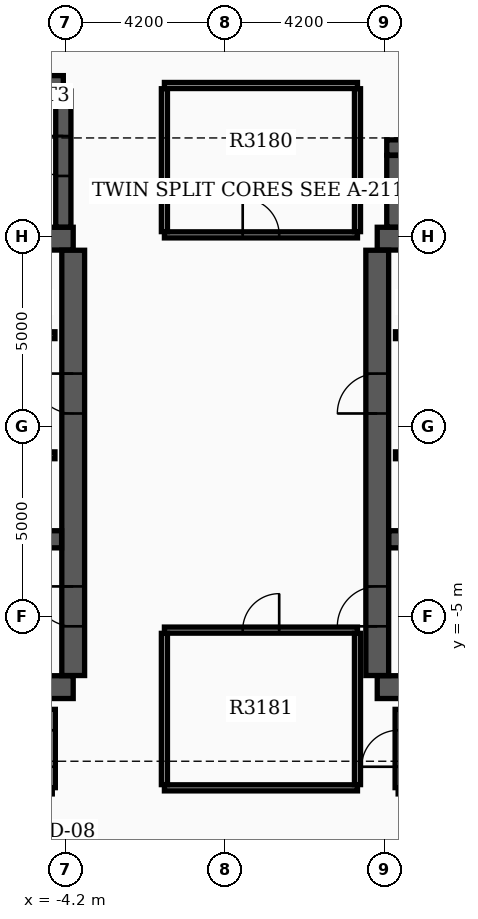
"""IFC4 building model, lengths in metres.
Left out: names, types, materials, properties, quantities, classifications, styles, units other than length and angle.
Written with IfcOpenShell. Run it as: python <this file> out.ifc"""

import sys

from ifc_helpers import new_model, si_unit, direction, frame, frame_2d, origin, place, context, subcontext, project, spatial, rectangle, extrude, element, fill, save


model = new_model("IFC4")
c1 = context("Model", 3, precision=1e-05, world=origin(), true_north=direction((0.0, 1.0)))
c2 = subcontext(c1, "Body", "Model", "MODEL_VIEW")
j1 = project(units=[si_unit("LENGTHUNIT", "METRE"), si_unit("PLANEANGLEUNIT", "RADIAN")], contexts=[c1])
p1 = place(None, origin())
s1 = spatial("IfcSite", under=j1, at=p1, CompositionType="ELEMENT")
p2 = place(p1, origin())
s2 = spatial("IfcBuilding", under=s1, at=p2, CompositionType="ELEMENT")
p3 = place(p2, frame((0.0, 0.0, 201.3)))
s3 = spatial("IfcBuildingStorey", under=s2, at=p3, CompositionType="ELEMENT", Elevation=201.3)
for number, where, z_axis, x_axis in (
    (1, (-12.4, -6.85, 0.0), (0.0, 0.0, 1.0), (1.0, 0.0, 0.0)),
    (2, (-12.4, 4.95, 0.0), (0.0, 0.0, 1.0), (1.0, 0.0, 0.0)),
):
    element("IfcWall", number, at=place(p3, frame(where, z_axis=z_axis, x_axis=x_axis)), inside=s3, PredefinedType="SHEAR", context=c2, shape_type="SweptSolid", body=[
        extrude(rectangle(XDim=8.4, YDim=0.6, at=frame_2d((4.2, 0.0))), origin(), (0.0, 0.0, 1.0), 3.7),
    ])
p4 = place(p3, frame((-4.0, -6.545, 0.0), z_axis=(0.0, 0.0, 1.0), x_axis=(0.0, 1.0, 0.0)))
e3 = element("IfcWall", 3, at=p4, inside=s3, PredefinedType="SHEAR", context=c2, shape_type="SweptSolid", body=[
    extrude(rectangle(XDim=11.19, YDim=0.6, at=frame_2d((5.595, 0.0))), origin(), (0.0, 0.0, 1.0), 3.7),
])
p5 = place(p4, frame((1.295, 0.0, 0.0)))
e4 = element("IfcOpeningElement", 4, at=p5, cuts=e3, PredefinedType="OPENING", context=c2, shape_type="SweptSolid", body=[
    extrude(rectangle(XDim=1.05, YDim=2.15, at=frame_2d((0.525, 1.075))), frame((0.0, 0.31, 0.0), z_axis=(0.0, -1.0, 0.0), x_axis=(1.0, 0.0, 0.0)), (0.0, 0.0, 1.0), 0.62),
])
p6 = place(p4, frame((6.895, 0.0, 0.0)))
e5 = element("IfcOpeningElement", 5, at=p6, cuts=e3, PredefinedType="OPENING", context=c2, shape_type="SweptSolid", body=[
    extrude(rectangle(XDim=1.05, YDim=2.15, at=frame_2d((0.525, 1.075))), frame((0.0, 0.31, 0.0), z_axis=(0.0, -1.0, 0.0), x_axis=(1.0, 0.0, 0.0)), (0.0, 0.0, 1.0), 0.62),
])
p7 = place(p3, frame((-12.095, -2.96, 0.0), z_axis=(0.0, 0.0, 1.0), x_axis=(1.0, 0.0, 0.0)))
e6 = element("IfcWall", 6, at=p7, inside=s3, PredefinedType="SHEAR", context=c2, shape_type="SweptSolid", body=[
    extrude(rectangle(XDim=7.79, YDim=0.45, at=frame_2d((3.895, 0.0))), origin(), (0.0, 0.0, 1.0), 3.7),
])
for number, where, z_axis, x_axis in (
    (7, (4.0, -6.85, 0.0), (0.0, 0.0, 1.0), (1.0, 0.0, 0.0)),
    (8, (4.0, 4.95, 0.0), (0.0, 0.0, 1.0), (1.0, 0.0, 0.0)),
):
    element("IfcWall", number, at=place(p3, frame(where, z_axis=z_axis, x_axis=x_axis)), inside=s3, PredefinedType="SHEAR", context=c2, shape_type="SweptSolid", body=[
        extrude(rectangle(XDim=8.4, YDim=0.6, at=frame_2d((4.2, 0.0))), origin(), (0.0, 0.0, 1.0), 3.7),
    ])
p8 = place(p3, frame((4.0, -6.545, 0.0), z_axis=(0.0, 0.0, 1.0), x_axis=(0.0, 1.0, 0.0)))
e9 = element("IfcWall", 9, at=p8, inside=s3, PredefinedType="SHEAR", context=c2, shape_type="SweptSolid", body=[
    extrude(rectangle(XDim=11.19, YDim=0.6, at=frame_2d((5.595, 0.0))), origin(), (0.0, 0.0, 1.0), 3.7),
])
p9 = place(p8, frame((1.295, 0.0, 0.0)))
e10 = element("IfcOpeningElement", 10, at=p9, cuts=e9, PredefinedType="OPENING", context=c2, shape_type="SweptSolid", body=[
    extrude(rectangle(XDim=1.05, YDim=2.15, at=frame_2d((0.525, 1.075))), frame((0.0, 0.31, 0.0), z_axis=(0.0, -1.0, 0.0), x_axis=(1.0, 0.0, 0.0)), (0.0, 0.0, 1.0), 0.62),
])
p10 = place(p8, frame((6.895, 0.0, 0.0)))
e11 = element("IfcOpeningElement", 11, at=p10, cuts=e9, PredefinedType="OPENING", context=c2, shape_type="SweptSolid", body=[
    extrude(rectangle(XDim=1.05, YDim=2.15, at=frame_2d((0.525, 1.075))), frame((0.0, 0.31, 0.0), z_axis=(0.0, -1.0, 0.0), x_axis=(1.0, 0.0, 0.0)), (0.0, 0.0, 1.0), 0.62),
])
p11 = place(p3, frame((4.305, -2.96, 0.0), z_axis=(0.0, 0.0, 1.0), x_axis=(1.0, 0.0, 0.0)))
e12 = element("IfcWall", 12, at=p11, inside=s3, PredefinedType="SHEAR", context=c2, shape_type="SweptSolid", body=[
    extrude(rectangle(XDim=7.79, YDim=0.45, at=frame_2d((3.895, 0.0))), origin(), (0.0, 0.0, 1.0), 3.7),
])
p12 = place(p3, frame((-12.22, 9.04, 0.0), z_axis=(0.0, 0.0, 1.0), x_axis=(1.0, 0.0, 0.0)))
e13 = element("IfcWall", 13, at=p12, inside=s3, PredefinedType="SHEAR", context=c2, shape_type="SweptSolid", body=[
    extrude(rectangle(XDim=7.96, YDim=0.4, at=frame_2d((3.98, 0.0))), origin(), (0.0, 0.0, 1.0), 3.7),
])
p13 = place(p3, frame((-4.26, 5.255, 0.0), z_axis=(0.0, 0.0, 1.0), x_axis=(0.0, 1.0, 0.0)))
e14 = element("IfcWall", 14, at=p13, inside=s3, PredefinedType="SHEAR", context=c2, shape_type="SweptSolid", body=[
    extrude(rectangle(XDim=3.58, YDim=0.4, at=frame_2d((1.79, 0.0))), origin(), (0.0, 0.0, 1.0), 3.7),
])
p14 = place(p13, frame((1.345, 0.0, 0.0)))
e15 = element("IfcOpeningElement", 15, at=p14, cuts=e14, PredefinedType="OPENING", context=c2, shape_type="SweptSolid", body=[
    extrude(rectangle(XDim=1.05, YDim=2.15, at=frame_2d((0.525, 1.075))), frame((0.0, 0.21, 0.0), z_axis=(0.0, -1.0, 0.0), x_axis=(1.0, 0.0, 0.0)), (0.0, 0.0, 1.0), 0.42),
])
p15 = place(p3, frame((4.45, 5.255, 0.0), z_axis=(0.0, 0.0, 1.0), x_axis=(0.0, 1.0, 0.0)))
e16 = element("IfcWall", 16, at=p15, inside=s3, PredefinedType="SHEAR", context=c2, shape_type="SweptSolid", body=[
    extrude(rectangle(XDim=1.885, YDim=0.4, at=frame_2d((0.942, 0.0))), origin(), (0.0, 0.0, 1.0), 3.7),
])
p16 = place(p3, frame((4.25, 7.35, 0.0), z_axis=(0.0, 0.0, 1.0), x_axis=(1.0, 0.0, 0.0)))
e17 = element("IfcWall", 17, at=p16, inside=s3, PredefinedType="SHEAR", context=c2, shape_type="SweptSolid", body=[
    extrude(rectangle(XDim=5.4, YDim=0.4, at=frame_2d((2.7, 0.0))), origin(), (0.0, 0.0, 1.0), 3.7),
])
p17 = place(p3, frame((-11.9, 2.41, 0.0), z_axis=(0.0, 0.0, 1.0), x_axis=(1.0, 0.0, 0.0)))
e18 = element("IfcWall", 18, at=p17, inside=s3, PredefinedType="SOLIDWALL", context=c2, shape_type="SweptSolid", body=[
    extrude(rectangle(XDim=7.42, YDim=0.18, at=frame_2d((3.71, 0.0))), origin(), (0.0, 0.0, 1.0), 3.17),
])
p18 = place(p17, frame((0.55, 0.0, 0.0)))
e19 = element("IfcOpeningElement", 19, at=p18, cuts=e18, PredefinedType="OPENING", context=c2, shape_type="SweptSolid", body=[
    extrude(rectangle(XDim=1.1, YDim=2.15, at=frame_2d((0.55, 1.075))), frame((0.0, 0.1, 0.0), z_axis=(0.0, -1.0, 0.0), x_axis=(1.0, 0.0, 0.0)), (0.0, 0.0, 1.0), 0.2),
])
p19 = place(p17, frame((4.9, 0.0, 0.0)))
e20 = element("IfcOpeningElement", 20, at=p19, cuts=e18, PredefinedType="OPENING", context=c2, shape_type="SweptSolid", body=[
    extrude(rectangle(XDim=0.88, YDim=2.1, at=frame_2d((0.44, 1.05))), frame((0.0, 0.1, 0.0), z_axis=(0.0, -1.0, 0.0), x_axis=(1.0, 0.0, 0.0)), (0.0, 0.0, 1.0), 0.2),
])
p20 = place(p3, frame((4.48, 2.41, 0.0), z_axis=(0.0, 0.0, 1.0), x_axis=(1.0, 0.0, 0.0)))
e21 = element("IfcWall", 21, at=p20, inside=s3, PredefinedType="SOLIDWALL", context=c2, shape_type="SweptSolid", body=[
    extrude(rectangle(XDim=7.42, YDim=0.18, at=frame_2d((3.71, 0.0))), origin(), (0.0, 0.0, 1.0), 3.17),
])
p21 = place(p20, frame((5.67, 0.0, 0.0)))
e22 = element("IfcOpeningElement", 22, at=p21, cuts=e21, PredefinedType="OPENING", context=c2, shape_type="SweptSolid", body=[
    extrude(rectangle(XDim=1.1, YDim=2.15, at=frame_2d((0.55, 1.075))), frame((0.0, 0.1, 0.0), z_axis=(0.0, -1.0, 0.0), x_axis=(1.0, 0.0, 0.0)), (0.0, 0.0, 1.0), 0.2),
])
p22 = place(p20, frame((1.6, 0.0, 0.0)))
e23 = element("IfcOpeningElement", 23, at=p22, cuts=e21, PredefinedType="OPENING", context=c2, shape_type="SweptSolid", body=[
    extrude(rectangle(XDim=0.88, YDim=2.1, at=frame_2d((0.44, 1.05))), frame((0.0, 0.1, 0.0), z_axis=(0.0, -1.0, 0.0), x_axis=(1.0, 0.0, 0.0)), (0.0, 0.0, 1.0), 0.2),
])
p23 = place(p3, frame((-11.9, -0.75, 0.0), z_axis=(0.0, 0.0, 1.0), x_axis=(1.0, 0.0, 0.0)))
e24 = element("IfcWall", 24, at=p23, inside=s3, PredefinedType="SOLIDWALL", context=c2, shape_type="SweptSolid", body=[
    extrude(rectangle(XDim=7.42, YDim=0.18, at=frame_2d((3.71, 0.0))), origin(), (0.0, 0.0, 1.0), 3.17),
])
p24 = place(p23, frame((5.75, 0.0, 0.0)))
e25 = element("IfcOpeningElement", 25, at=p24, cuts=e24, PredefinedType="OPENING", context=c2, shape_type="SweptSolid", body=[
    extrude(rectangle(XDim=1.1, YDim=2.15, at=frame_2d((0.55, 1.075))), frame((0.0, 0.1, 0.0), z_axis=(0.0, -1.0, 0.0), x_axis=(1.0, 0.0, 0.0)), (0.0, 0.0, 1.0), 0.2),
])
p25 = place(p3, frame((4.48, -0.75, 0.0), z_axis=(0.0, 0.0, 1.0), x_axis=(1.0, 0.0, 0.0)))
e26 = element("IfcWall", 26, at=p25, inside=s3, PredefinedType="SOLIDWALL", context=c2, shape_type="SweptSolid", body=[
    extrude(rectangle(XDim=7.42, YDim=0.18, at=frame_2d((3.71, 0.0))), origin(), (0.0, 0.0, 1.0), 3.17),
])
p26 = place(p25, frame((3.92, 0.0, 0.0)))
e27 = element("IfcOpeningElement", 27, at=p26, cuts=e26, PredefinedType="OPENING", context=c2, shape_type="SweptSolid", body=[
    extrude(rectangle(XDim=1.1, YDim=2.15, at=frame_2d((0.55, 1.075))), frame((0.0, 0.1, 0.0), z_axis=(0.0, -1.0, 0.0), x_axis=(1.0, 0.0, 0.0)), (0.0, 0.0, 1.0), 0.2),
])
p27 = place(p25, frame((5.82, 0.0, 0.0)))
e28 = element("IfcOpeningElement", 28, at=p27, cuts=e26, PredefinedType="OPENING", context=c2, shape_type="SweptSolid", body=[
    extrude(rectangle(XDim=1.1, YDim=2.15, at=frame_2d((0.55, 1.075))), frame((0.0, 0.1, 0.0), z_axis=(0.0, -1.0, 0.0), x_axis=(1.0, 0.0, 0.0)), (0.0, 0.0, 1.0), 0.2),
])
p28 = place(p3, frame((-1.6, 5.05, 0.0), z_axis=(0.0, 0.0, 1.0), x_axis=(1.0, 0.0, 0.0)))
e29 = element("IfcWall", 29, at=p28, inside=s3, PredefinedType="PARTITIONING", context=c2, shape_type="SweptSolid", body=[
    extrude(rectangle(XDim=5.08, YDim=0.16, at=frame_2d((2.54, 0.0))), origin(), (0.0, 0.0, 1.0), 3.17),
])
p29 = place(p28, frame((2.06, 0.0, 0.0)))
e30 = element("IfcOpeningElement", 30, at=p29, cuts=e29, PredefinedType="OPENING", context=c2, shape_type="SweptSolid", body=[
    extrude(rectangle(XDim=0.96, YDim=2.15, at=frame_2d((0.48, 1.075))), frame((0.0, 0.09, 0.0), z_axis=(0.0, -1.0, 0.0), x_axis=(1.0, 0.0, 0.0)), (0.0, 0.0, 1.0), 0.18),
])
p30 = place(p3, frame((-1.6, 8.98, 0.0), z_axis=(0.0, 0.0, 1.0), x_axis=(1.0, 0.0, 0.0)))
e31 = element("IfcWall", 31, at=p30, inside=s3, PredefinedType="PARTITIONING", context=c2, shape_type="SweptSolid", body=[
    extrude(rectangle(XDim=5.08, YDim=0.16, at=frame_2d((2.54, 0.0))), origin(), (0.0, 0.0, 1.0), 3.17),
])
for number, where, z_axis, x_axis in (
    (32, (-1.6, 5.135, 0.0), (0.0, 0.0, 1.0), (0.0, 1.0, 0.0)),
    (33, (3.48, 5.135, 0.0), (0.0, 0.0, 1.0), (0.0, 1.0, 0.0)),
):
    element("IfcWall", number, at=place(p3, frame(where, z_axis=z_axis, x_axis=x_axis)), inside=s3, PredefinedType="PARTITIONING", context=c2, shape_type="SweptSolid", body=[
        extrude(rectangle(XDim=3.76, YDim=0.16, at=frame_2d((1.88, 0.0))), origin(), (0.0, 0.0, 1.0), 3.17),
    ])
p31 = place(p3, frame((-1.6, -9.5, 0.0), z_axis=(0.0, 0.0, 1.0), x_axis=(1.0, 0.0, 0.0)))
e34 = element("IfcWall", 34, at=p31, inside=s3, PredefinedType="PARTITIONING", context=c2, shape_type="SweptSolid", body=[
    extrude(rectangle(XDim=5.08, YDim=0.16, at=frame_2d((2.54, 0.0))), origin(), (0.0, 0.0, 1.0), 3.17),
])
p32 = place(p3, frame((-1.6, -5.35, 0.0), z_axis=(0.0, 0.0, 1.0), x_axis=(1.0, 0.0, 0.0)))
e35 = element("IfcWall", 35, at=p32, inside=s3, PredefinedType="PARTITIONING", context=c2, shape_type="SweptSolid", body=[
    extrude(rectangle(XDim=5.08, YDim=0.16, at=frame_2d((2.54, 0.0))), origin(), (0.0, 0.0, 1.0), 3.17),
])
p33 = place(p32, frame((2.06, 0.0, 0.0)))
e36 = element("IfcOpeningElement", 36, at=p33, cuts=e35, PredefinedType="OPENING", context=c2, shape_type="SweptSolid", body=[
    extrude(rectangle(XDim=0.96, YDim=2.15, at=frame_2d((0.48, 1.075))), frame((0.0, 0.09, 0.0), z_axis=(0.0, -1.0, 0.0), x_axis=(1.0, 0.0, 0.0)), (0.0, 0.0, 1.0), 0.18),
])
for number, where, z_axis, x_axis in (
    (37, (-1.6, -9.415, 0.0), (0.0, 0.0, 1.0), (0.0, 1.0, 0.0)),
    (38, (3.48, -9.415, 0.0), (0.0, 0.0, 1.0), (0.0, 1.0, 0.0)),
):
    element("IfcWall", number, at=place(p3, frame(where, z_axis=z_axis, x_axis=x_axis)), inside=s3, PredefinedType="PARTITIONING", context=c2, shape_type="SweptSolid", body=[
        extrude(rectangle(XDim=3.98, YDim=0.16, at=frame_2d((1.99, 0.0))), origin(), (0.0, 0.0, 1.0), 3.17),
    ])
p34 = place(p3, frame((4.55, -9.58, 0.0), z_axis=(0.0, 0.0, 1.0), x_axis=(1.0, 0.0, 0.0)))
e39 = element("IfcWall", 39, at=p34, inside=s3, PredefinedType="PARTITIONING", context=c2, shape_type="SweptSolid", body=[
    extrude(rectangle(XDim=8.1, YDim=0.16, at=frame_2d((4.05, 0.0))), origin(), (0.0, 0.0, 1.0), 3.17),
])
p35 = place(p3, frame((4.55, -9.495, 0.0), z_axis=(0.0, 0.0, 1.0), x_axis=(0.0, 1.0, 0.0)))
e40 = element("IfcWall", 40, at=p35, inside=s3, PredefinedType="PARTITIONING", context=c2, shape_type="SweptSolid", body=[
    extrude(rectangle(XDim=2.06, YDim=0.16, at=frame_2d((1.03, 0.0))), origin(), (0.0, 0.0, 1.0), 3.17),
])
p36 = place(p35, frame((0.55, 0.0, 0.0)))
e41 = element("IfcOpeningElement", 41, at=p36, cuts=e40, PredefinedType="OPENING", context=c2, shape_type="SweptSolid", body=[
    extrude(rectangle(XDim=0.96, YDim=2.15, at=frame_2d((0.48, 1.075))), frame((0.0, 0.09, 0.0), z_axis=(0.0, -1.0, 0.0), x_axis=(1.0, 0.0, 0.0)), (0.0, 0.0, 1.0), 0.18),
])
p37 = place(p3, frame((-4.55, -9.495, 0.0), z_axis=(0.0, 0.0, 1.0), x_axis=(0.0, 1.0, 0.0)))
e42 = element("IfcWall", 42, at=p37, inside=s3, PredefinedType="PARTITIONING", context=c2, shape_type="SweptSolid", body=[
    extrude(rectangle(XDim=2.06, YDim=0.16, at=frame_2d((1.03, 0.0))), origin(), (0.0, 0.0, 1.0), 3.17),
])
p38 = place(p37, frame((0.55, 0.0, 0.0)))
e43 = element("IfcOpeningElement", 43, at=p38, cuts=e42, PredefinedType="OPENING", context=c2, shape_type="SweptSolid", body=[
    extrude(rectangle(XDim=0.96, YDim=2.15, at=frame_2d((0.48, 1.075))), frame((0.0, 0.09, 0.0), z_axis=(0.0, -1.0, 0.0), x_axis=(1.0, 0.0, 0.0)), (0.0, 0.0, 1.0), 0.18),
])
p39 = place(p5, origin())
e44 = element("IfcDoor", 44, at=p39, inside=s3, OperationType="SINGLE_SWING_RIGHT", PredefinedType="DOOR", context=c2, shape_type="SweptSolid", body=[
    extrude(rectangle(XDim=1.05, YDim=2.15, at=frame_2d((0.525, 1.075))), frame((0.0, 0.025, 0.0), z_axis=(0.0, -1.0, 0.0), x_axis=(1.0, 0.0, 0.0)), (0.0, 0.0, 1.0), 0.05),
])
fill(e4, e44)
p40 = place(p9, origin())
e45 = element("IfcDoor", 45, at=p40, inside=s3, OperationType="SINGLE_SWING_LEFT", PredefinedType="DOOR", context=c2, shape_type="SweptSolid", body=[
    extrude(rectangle(XDim=1.05, YDim=2.15, at=frame_2d((0.525, 1.075))), frame((0.0, 0.025, 0.0), z_axis=(0.0, -1.0, 0.0), x_axis=(1.0, 0.0, 0.0)), (0.0, 0.0, 1.0), 0.05),
])
fill(e10, e45)
p41 = place(p6, origin())
e46 = element("IfcDoor", 46, at=p41, inside=s3, OperationType="SINGLE_SWING_RIGHT", PredefinedType="DOOR", context=c2, shape_type="SweptSolid", body=[
    extrude(rectangle(XDim=1.05, YDim=2.15, at=frame_2d((0.525, 1.075))), frame((0.0, 0.025, 0.0), z_axis=(0.0, -1.0, 0.0), x_axis=(1.0, 0.0, 0.0)), (0.0, 0.0, 1.0), 0.05),
])
fill(e5, e46)
p42 = place(p10, origin())
e47 = element("IfcDoor", 47, at=p42, inside=s3, OperationType="SINGLE_SWING_LEFT", PredefinedType="DOOR", context=c2, shape_type="SweptSolid", body=[
    extrude(rectangle(XDim=1.05, YDim=2.15, at=frame_2d((0.525, 1.075))), frame((0.0, 0.025, 0.0), z_axis=(0.0, -1.0, 0.0), x_axis=(1.0, 0.0, 0.0)), (0.0, 0.0, 1.0), 0.05),
])
fill(e11, e47)
p43 = place(p14, origin())
e48 = element("IfcDoor", 48, at=p43, inside=s3, OperationType="SINGLE_SWING_RIGHT", PredefinedType="DOOR", context=c2, shape_type="SweptSolid", body=[
    extrude(rectangle(XDim=1.05, YDim=2.15, at=frame_2d((0.525, 1.075))), frame((0.0, 0.025, 0.0), z_axis=(0.0, -1.0, 0.0), x_axis=(1.0, 0.0, 0.0)), (0.0, 0.0, 1.0), 0.05),
])
fill(e15, e48)
p44 = place(p29, origin())
e49 = element("IfcDoor", 49, at=p44, inside=s3, OperationType="SINGLE_SWING_LEFT", PredefinedType="DOOR", context=c2, shape_type="SweptSolid", body=[
    extrude(rectangle(XDim=0.96, YDim=2.15, at=frame_2d((0.48, 1.075))), frame((0.0, 0.025, 0.0), z_axis=(0.0, -1.0, 0.0), x_axis=(1.0, 0.0, 0.0)), (0.0, 0.0, 1.0), 0.05),
])
fill(e30, e49)
p45 = place(p33, origin())
e50 = element("IfcDoor", 50, at=p45, inside=s3, OperationType="SINGLE_SWING_RIGHT", PredefinedType="DOOR", context=c2, shape_type="SweptSolid", body=[
    extrude(rectangle(XDim=0.96, YDim=2.15, at=frame_2d((0.48, 1.075))), frame((0.0, 0.025, 0.0), z_axis=(0.0, -1.0, 0.0), x_axis=(1.0, 0.0, 0.0)), (0.0, 0.0, 1.0), 0.05),
])
fill(e36, e50)
p46 = place(p36, origin())
e51 = element("IfcDoor", 51, at=p46, inside=s3, OperationType="SINGLE_SWING_LEFT", PredefinedType="DOOR", context=c2, shape_type="SweptSolid", body=[
    extrude(rectangle(XDim=0.96, YDim=2.15, at=frame_2d((0.48, 1.075))), frame((0.0, 0.025, 0.0), z_axis=(0.0, -1.0, 0.0), x_axis=(1.0, 0.0, 0.0)), (0.0, 0.0, 1.0), 0.05),
])
fill(e41, e51)
p47 = place(p38, origin())
e52 = element("IfcDoor", 52, at=p47, inside=s3, OperationType="SINGLE_SWING_RIGHT", PredefinedType="DOOR", context=c2, shape_type="SweptSolid", body=[
    extrude(rectangle(XDim=0.96, YDim=2.15, at=frame_2d((0.48, 1.075))), frame((0.0, 0.025, 0.0), z_axis=(0.0, -1.0, 0.0), x_axis=(1.0, 0.0, 0.0)), (0.0, 0.0, 1.0), 0.05),
])
fill(e43, e52)
save(model, sys.argv[1])
